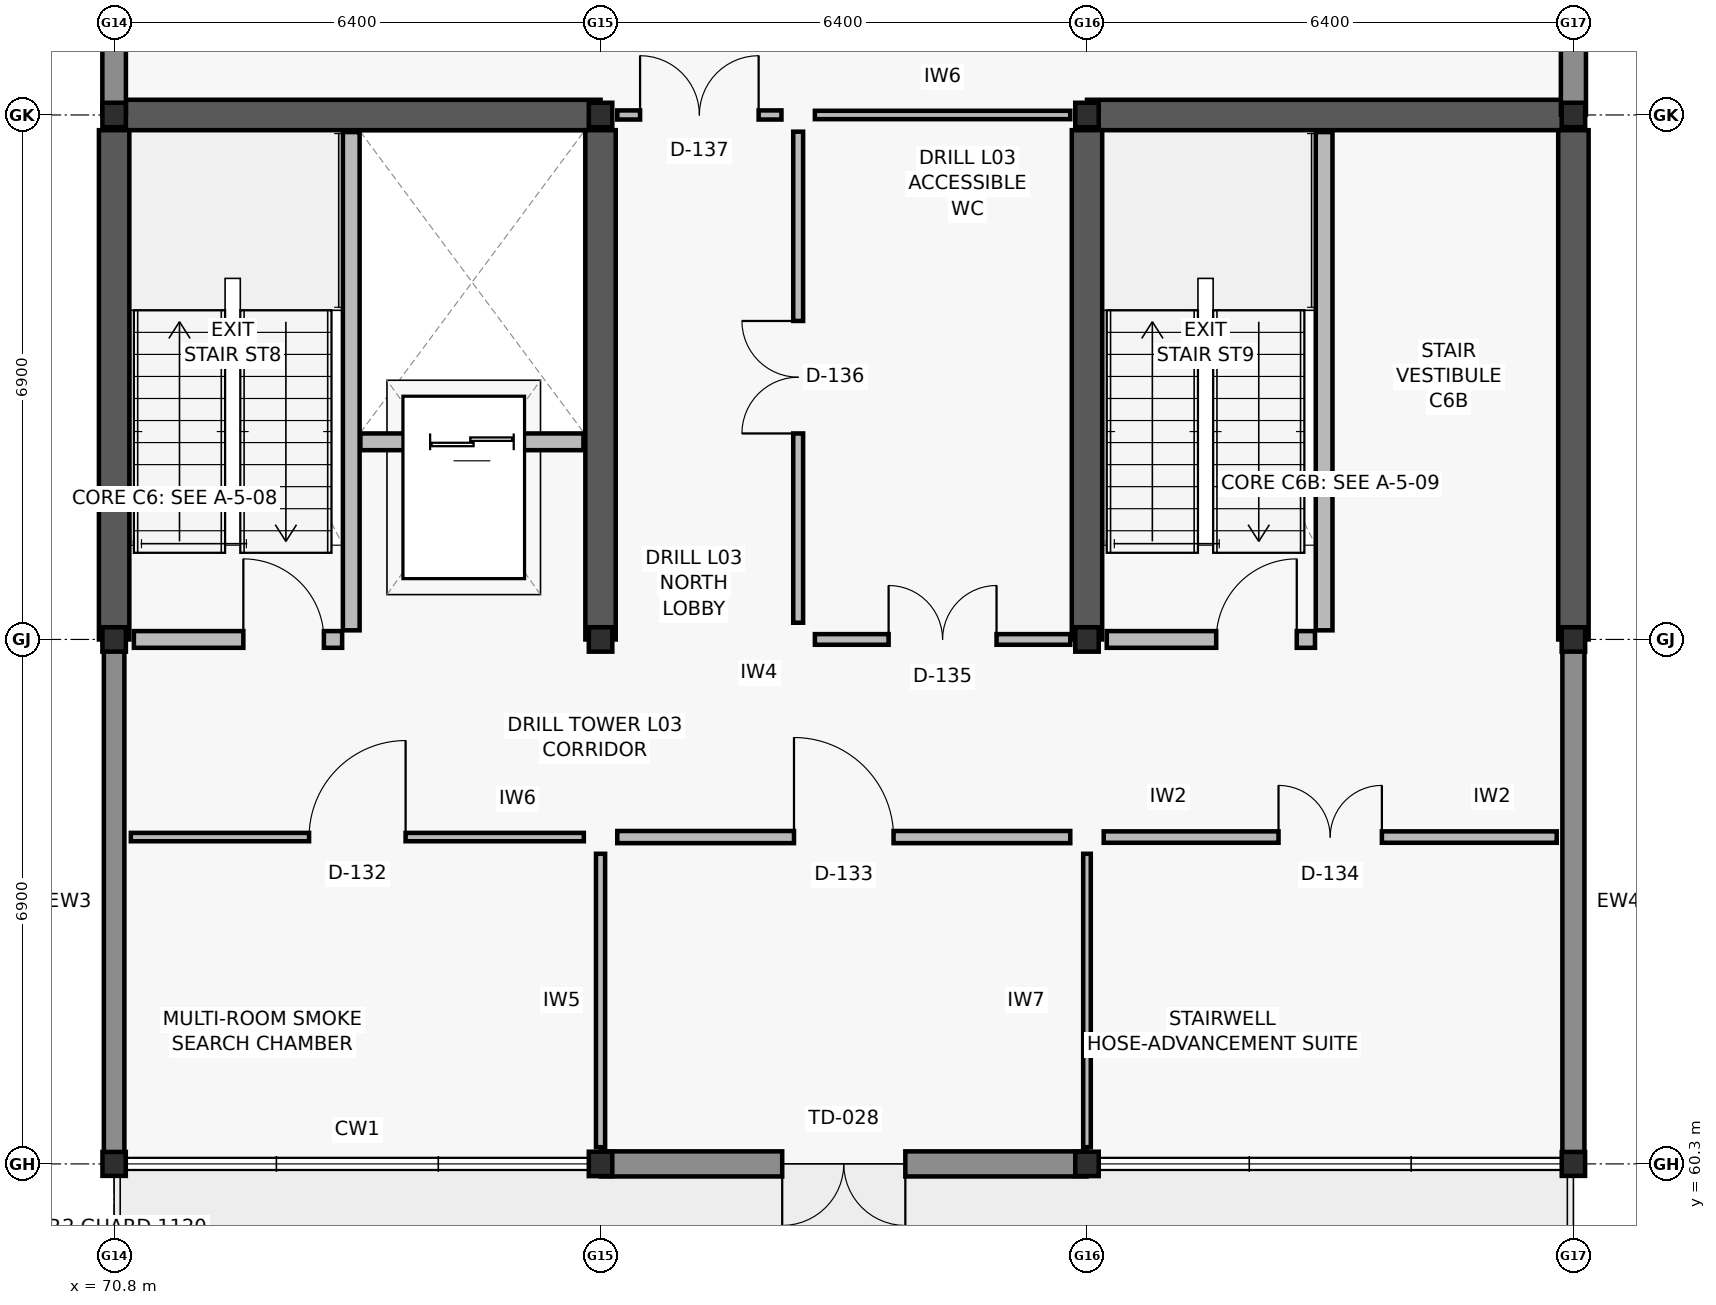
"""IFC4 building model, lengths in metres.
Left out: names, types, materials, properties, quantities, classifications, styles, units other than length and angle.
Written with IfcOpenShell. Run it as: python <this file> out.ifc"""

import sys

from ifc_helpers import new_model, si_unit, direction, frame, frame_2d, origin, origin_2d, place, context, subcontext, project, spatial, rectangle, i_section, extrude, element, fill, save


model = new_model("IFC4")
c1 = context("Model", 3, precision=1e-05, world=origin(), true_north=direction((0.0, 1.0)))
c2 = subcontext(c1, "Body", "Model", "MODEL_VIEW")
j1 = project(units=[si_unit("LENGTHUNIT", "METRE"), si_unit("PLANEANGLEUNIT", "RADIAN")], contexts=[c1])
p1 = place(None, origin())
s1 = spatial("IfcSite", under=j1, at=p1, CompositionType="ELEMENT")
p2 = place(p1, origin())
s2 = spatial("IfcBuilding", under=s1, at=p2, CompositionType="ELEMENT")
p3 = place(p2, frame((0.0, 0.0, 13.5)))
s3 = spatial("IfcBuildingStorey", under=s2, at=p3, CompositionType="ELEMENT", Elevation=13.5)
p4 = place(p3, frame((70.8, 60.3, 0.0), z_axis=(0.0, 0.0, 1.0), x_axis=(1.0, 0.0, 0.0)))
e1 = element("IfcColumn", 1, at=p4, inside=s3, PredefinedType="COLUMN", context=c2, shape_type="SweptSolid", body=[
    extrude(i_section(OverallWidth=0.307, OverallDepth=0.315, WebThickness=0.012, FlangeThickness=0.019, FilletRadius=0.017, at=origin_2d()), origin(), (0.0, 0.0, 1.0), 3.9),
])
for number, where, z_axis, x_axis in (
    (2, (70.8, 67.2, 0.0), (0.0, 0.0, 1.0), (1.0, 0.0, 0.0)),
    (3, (70.8, 74.1, 0.0), (0.0, 0.0, 1.0), (1.0, 0.0, 0.0)),
    (4, (77.2, 60.3, 0.0), (0.0, 0.0, 1.0), (1.0, 0.0, 0.0)),
    (5, (77.2, 67.2, 0.0), (0.0, 0.0, 1.0), (1.0, 0.0, 0.0)),
    (6, (77.2, 74.1, 0.0), (0.0, 0.0, 1.0), (1.0, 0.0, 0.0)),
    (7, (83.6, 60.3, 0.0), (0.0, 0.0, 1.0), (1.0, 0.0, 0.0)),
    (8, (83.6, 67.2, 0.0), (0.0, 0.0, 1.0), (1.0, 0.0, 0.0)),
    (9, (83.6, 74.1, 0.0), (0.0, 0.0, 1.0), (1.0, 0.0, 0.0)),
):
    element("IfcColumn", number, at=place(p3, frame(where, z_axis=z_axis, x_axis=x_axis)), inside=s3, PredefinedType="COLUMN", context=c2, shape_type="SweptSolid", body=[
        extrude(i_section(OverallWidth=0.309, OverallDepth=0.321, WebThickness=0.014, FlangeThickness=0.022, FilletRadius=0.017, at=origin_2d()), origin(), (0.0, 0.0, 1.0), 3.9),
    ])
p5 = place(p3, frame((90.0, 60.3, 0.0), z_axis=(0.0, 0.0, 1.0), x_axis=(1.0, 0.0, 0.0)))
e10 = element("IfcColumn", 10, at=p5, inside=s3, PredefinedType="COLUMN", context=c2, shape_type="SweptSolid", body=[
    extrude(i_section(OverallWidth=0.307, OverallDepth=0.315, WebThickness=0.012, FlangeThickness=0.019, FilletRadius=0.017, at=origin_2d()), origin(), (0.0, 0.0, 1.0), 3.9),
])
for number, where, z_axis, x_axis in (
    (11, (90.0, 67.2, 0.0), (0.0, 0.0, 1.0), (1.0, 0.0, 0.0)),
    (12, (90.0, 74.1, 0.0), (0.0, 0.0, 1.0), (1.0, 0.0, 0.0)),
):
    element("IfcColumn", number, at=place(p3, frame(where, z_axis=z_axis, x_axis=x_axis)), inside=s3, PredefinedType="COLUMN", context=c2, shape_type="SweptSolid", body=[
        extrude(i_section(OverallWidth=0.309, OverallDepth=0.321, WebThickness=0.014, FlangeThickness=0.022, FilletRadius=0.017, at=origin_2d()), origin(), (0.0, 0.0, 1.0), 3.9),
    ])
p6 = place(p3, frame((70.8, 74.1, 0.0), z_axis=(0.0, 0.0, 1.0), x_axis=(1.0, 0.0, 0.0)))
e13 = element("IfcWall", 13, at=p6, inside=s3, PredefinedType="SHEAR", context=c2, shape_type="SweptSolid", body=[
    extrude(rectangle(XDim=6.4, YDim=0.4, at=frame_2d((3.2, 0.0))), origin(), (0.0, 0.0, 1.0), 3.66),
])
for number, where, z_axis, x_axis in (
    (14, (70.8, 67.2, 0.0), (0.0, 0.0, 1.0), (0.0, 1.0, 0.0)),
    (15, (77.2, 67.2, 0.0), (0.0, 0.0, 1.0), (0.0, 1.0, 0.0)),
):
    element("IfcWall", number, at=place(p3, frame(where, z_axis=z_axis, x_axis=x_axis)), inside=s3, PredefinedType="SHEAR", context=c2, shape_type="SweptSolid", body=[
        extrude(rectangle(XDim=6.7, YDim=0.4, at=frame_2d((3.35, 0.0))), origin(), (0.0, 0.0, 1.0), 3.66),
    ])
p7 = place(p3, frame((83.6, 74.1, 0.0), z_axis=(0.0, 0.0, 1.0), x_axis=(1.0, 0.0, 0.0)))
e16 = element("IfcWall", 16, at=p7, inside=s3, PredefinedType="SHEAR", context=c2, shape_type="SweptSolid", body=[
    extrude(rectangle(XDim=6.4, YDim=0.4, at=frame_2d((3.2, 0.0))), origin(), (0.0, 0.0, 1.0), 3.66),
])
for number, where, z_axis, x_axis in (
    (17, (83.6, 67.2, 0.0), (0.0, 0.0, 1.0), (0.0, 1.0, 0.0)),
    (18, (90.0, 67.2, 0.0), (0.0, 0.0, 1.0), (0.0, 1.0, 0.0)),
):
    element("IfcWall", number, at=place(p3, frame(where, z_axis=z_axis, x_axis=x_axis)), inside=s3, PredefinedType="SHEAR", context=c2, shape_type="SweptSolid", body=[
        extrude(rectangle(XDim=6.7, YDim=0.4, at=frame_2d((3.35, 0.0))), origin(), (0.0, 0.0, 1.0), 3.66),
    ])
p8 = place(p3, frame((83.595, 60.3, 0.0), z_axis=(0.0, 0.0, 1.0), x_axis=(-1.0, 0.0, 0.0)))
e19 = element("IfcWall", 19, at=p8, inside=s3, PredefinedType="SOLIDWALL", context=c2, shape_type="SweptSolid", body=[
    extrude(rectangle(XDim=6.39, YDim=0.33, at=frame_2d((3.195, 0.0))), origin(), (0.0, 0.0, 1.0), 3.02),
])
p9 = place(p8, frame((2.385, 0.0, 0.0)))
e20 = element("IfcOpeningElement", 20, at=p9, cuts=e19, PredefinedType="OPENING", context=c2, shape_type="SweptSolid", body=[
    extrude(rectangle(XDim=1.62, YDim=2.18, at=frame_2d((0.81, 1.09))), frame((0.0, 0.175, 0.0), z_axis=(0.0, -1.0, 0.0), x_axis=(1.0, 0.0, 0.0)), (0.0, 0.0, 1.0), 0.35),
])
p10 = place(p3, frame((70.8, 60.305, 0.0), z_axis=(0.0, 0.0, 1.0), x_axis=(0.0, 1.0, 0.0)))
e21 = element("IfcWall", 21, at=p10, inside=s3, PredefinedType="SOLIDWALL", context=c2, shape_type="SweptSolid", body=[
    extrude(rectangle(XDim=6.89, YDim=0.27, at=frame_2d((3.445, 0.0))), origin(), (0.0, 0.0, 1.0), 3.02),
])
p11 = place(p3, frame((90.0, 67.195, 0.0), z_axis=(0.0, 0.0, 1.0), x_axis=(0.0, -1.0, 0.0)))
e22 = element("IfcWall", 22, at=p11, inside=s3, PredefinedType="SOLIDWALL", context=c2, shape_type="SweptSolid", body=[
    extrude(rectangle(XDim=6.89, YDim=0.29, at=frame_2d((3.445, 0.0))), origin(), (0.0, 0.0, 1.0), 3.02),
])
p12 = place(p3, frame((70.8, 74.105, 0.0), z_axis=(0.0, 0.0, 1.0), x_axis=(0.0, 1.0, 0.0)))
e23 = element("IfcWall", 23, at=p12, inside=s3, PredefinedType="SOLIDWALL", context=c2, shape_type="SweptSolid", body=[
    extrude(rectangle(XDim=6.89, YDim=0.31, at=frame_2d((3.445, 0.0))), origin(), (0.0, 0.0, 1.0), 3.02),
])
p13 = place(p12, frame((2.745, 0.0, 0.8)))
e24 = element("IfcOpeningElement", 24, at=p13, cuts=e23, PredefinedType="OPENING", context=c2, shape_type="SweptSolid", body=[
    extrude(rectangle(XDim=1.4, YDim=1.65, at=frame_2d((0.7, 0.825))), frame((0.0, 0.165, 0.0), z_axis=(0.0, -1.0, 0.0), x_axis=(1.0, 0.0, 0.0)), (0.0, 0.0, 1.0), 0.33),
])
p14 = place(p3, frame((90.0, 80.995, 0.0), z_axis=(0.0, 0.0, 1.0), x_axis=(0.0, -1.0, 0.0)))
e25 = element("IfcWall", 25, at=p14, inside=s3, PredefinedType="SOLIDWALL", context=c2, shape_type="SweptSolid", body=[
    extrude(rectangle(XDim=6.89, YDim=0.33, at=frame_2d((3.445, 0.0))), origin(), (0.0, 0.0, 1.0), 3.02),
])
p15 = place(p14, frame((2.67, 0.0, 0.8)))
e26 = element("IfcOpeningElement", 26, at=p15, cuts=e25, PredefinedType="OPENING", context=c2, shape_type="SweptSolid", body=[
    extrude(rectangle(XDim=1.55, YDim=1.65, at=frame_2d((0.775, 0.825))), frame((0.0, 0.175, 0.0), z_axis=(0.0, -1.0, 0.0), x_axis=(1.0, 0.0, 0.0)), (0.0, 0.0, 1.0), 0.35),
])
p16 = place(p3, frame((73.92, 67.32, 0.0), z_axis=(0.0, 0.0, 1.0), x_axis=(0.0, 1.0, 0.0)))
e27 = element("IfcWall", 27, at=p16, inside=s3, PredefinedType="SOLIDWALL", context=c2, shape_type="SweptSolid", body=[
    extrude(rectangle(XDim=6.555, YDim=0.22, at=frame_2d((3.277, 0.0))), origin(), (0.0, 0.0, 1.0), 3.66),
])
p17 = place(p3, frame((71.06, 67.2, 0.0), z_axis=(0.0, 0.0, 1.0), x_axis=(1.0, 0.0, 0.0)))
e28 = element("IfcWall", 28, at=p17, inside=s3, PredefinedType="SOLIDWALL", context=c2, shape_type="SweptSolid", body=[
    extrude(rectangle(XDim=2.74, YDim=0.22, at=frame_2d((1.37, 0.0))), origin(), (0.0, 0.0, 1.0), 3.02),
])
p18 = place(p17, frame((1.44, 0.0, 0.0)))
e29 = element("IfcOpeningElement", 29, at=p18, cuts=e28, PredefinedType="OPENING", context=c2, shape_type="SweptSolid", body=[
    extrude(rectangle(XDim=1.06, YDim=2.1, at=frame_2d((0.53, 1.05))), frame((0.0, 0.12, 0.0), z_axis=(0.0, -1.0, 0.0), x_axis=(1.0, 0.0, 0.0)), (0.0, 0.0, 1.0), 0.24),
])
p19 = place(p3, frame((74.04, 69.8, 0.0), z_axis=(0.0, 0.0, 1.0), x_axis=(1.0, 0.0, 0.0)))
e30 = element("IfcWall", 30, at=p19, inside=s3, PredefinedType="SOLIDWALL", context=c2, shape_type="SweptSolid", body=[
    extrude(rectangle(XDim=2.935, YDim=0.22, at=frame_2d((1.468, 0.0))), origin(), (0.0, 0.0, 1.0), 3.66),
])
p20 = place(p19, frame((0.917, 0.0, 0.0)))
e31 = element("IfcOpeningElement", 31, at=p20, cuts=e30, PredefinedType="OPENING", context=c2, shape_type="SweptSolid", body=[
    extrude(rectangle(XDim=1.1, YDim=2.1, at=frame_2d((0.55, 1.05))), frame((0.0, 0.12, 0.0), z_axis=(0.0, -1.0, 0.0), x_axis=(1.0, 0.0, 0.0)), (0.0, 0.0, 1.0), 0.24),
])
p21 = place(p3, frame((86.72, 67.32, 0.0), z_axis=(0.0, 0.0, 1.0), x_axis=(0.0, 1.0, 0.0)))
e32 = element("IfcWall", 32, at=p21, inside=s3, PredefinedType="SOLIDWALL", context=c2, shape_type="SweptSolid", body=[
    extrude(rectangle(XDim=6.555, YDim=0.22, at=frame_2d((3.277, 0.0))), origin(), (0.0, 0.0, 1.0), 3.66),
])
p22 = place(p3, frame((83.86, 67.2, 0.0), z_axis=(0.0, 0.0, 1.0), x_axis=(1.0, 0.0, 0.0)))
e33 = element("IfcWall", 33, at=p22, inside=s3, PredefinedType="SOLIDWALL", context=c2, shape_type="SweptSolid", body=[
    extrude(rectangle(XDim=2.74, YDim=0.22, at=frame_2d((1.37, 0.0))), origin(), (0.0, 0.0, 1.0), 3.02),
])
p23 = place(p22, frame((1.44, 0.0, 0.0)))
e34 = element("IfcOpeningElement", 34, at=p23, cuts=e33, PredefinedType="OPENING", context=c2, shape_type="SweptSolid", body=[
    extrude(rectangle(XDim=1.06, YDim=2.1, at=frame_2d((0.53, 1.05))), frame((0.0, 0.12, 0.0), z_axis=(0.0, -1.0, 0.0), x_axis=(1.0, 0.0, 0.0)), (0.0, 0.0, 1.0), 0.24),
])
p24 = place(p3, frame((77.2, 60.52, 0.0), z_axis=(0.0, 0.0, 1.0), x_axis=(0.0, 1.0, 0.0)))
e35 = element("IfcWall", 35, at=p24, inside=s3, PredefinedType="PARTITIONING", context=c2, shape_type="SweptSolid", body=[
    extrude(rectangle(XDim=3.86, YDim=0.12, at=frame_2d((1.93, 0.0))), origin(), (0.0, 0.0, 1.0), 3.0),
])
p25 = place(p3, frame((71.02, 64.6, 0.0), z_axis=(0.0, 0.0, 1.0), x_axis=(1.0, 0.0, 0.0)))
e36 = element("IfcWall", 36, at=p25, inside=s3, PredefinedType="PARTITIONING", context=c2, shape_type="SweptSolid", body=[
    extrude(rectangle(XDim=5.96, YDim=0.11, at=frame_2d((2.98, 0.0))), origin(), (0.0, 0.0, 1.0), 3.0),
])
p26 = place(p25, frame((2.345, 0.0, 0.0)))
e37 = element("IfcOpeningElement", 37, at=p26, cuts=e36, PredefinedType="OPENING", context=c2, shape_type="SweptSolid", body=[
    extrude(rectangle(XDim=1.27, YDim=2.1, at=frame_2d((0.635, 1.05))), frame((0.0, 0.065, 0.0), z_axis=(0.0, -1.0, 0.0), x_axis=(1.0, 0.0, 0.0)), (0.0, 0.0, 1.0), 0.13),
])
p27 = place(p3, frame((83.6, 60.52, 0.0), z_axis=(0.0, 0.0, 1.0), x_axis=(0.0, 1.0, 0.0)))
e38 = element("IfcWall", 38, at=p27, inside=s3, PredefinedType="PARTITIONING", context=c2, shape_type="SweptSolid", body=[
    extrude(rectangle(XDim=3.86, YDim=0.1, at=frame_2d((1.93, 0.0))), origin(), (0.0, 0.0, 1.0), 3.0),
])
p28 = place(p3, frame((77.42, 64.6, 0.0), z_axis=(0.0, 0.0, 1.0), x_axis=(1.0, 0.0, 0.0)))
e39 = element("IfcWall", 39, at=p28, inside=s3, PredefinedType="PARTITIONING", context=c2, shape_type="SweptSolid", body=[
    extrude(rectangle(XDim=5.96, YDim=0.16, at=frame_2d((2.98, 0.0))), origin(), (0.0, 0.0, 1.0), 3.0),
])
p29 = place(p28, frame((2.325, 0.0, 0.0)))
e40 = element("IfcOpeningElement", 40, at=p29, cuts=e39, PredefinedType="OPENING", context=c2, shape_type="SweptSolid", body=[
    extrude(rectangle(XDim=1.31, YDim=2.14, at=frame_2d((0.655, 1.07))), frame((0.0, 0.09, 0.0), z_axis=(0.0, -1.0, 0.0), x_axis=(1.0, 0.0, 0.0)), (0.0, 0.0, 1.0), 0.18),
])
p30 = place(p3, frame((83.82, 64.6, 0.0), z_axis=(0.0, 0.0, 1.0), x_axis=(1.0, 0.0, 0.0)))
e41 = element("IfcWall", 41, at=p30, inside=s3, PredefinedType="PARTITIONING", context=c2, shape_type="SweptSolid", body=[
    extrude(rectangle(XDim=5.96, YDim=0.15, at=frame_2d((2.98, 0.0))), origin(), (0.0, 0.0, 1.0), 3.0),
])
p31 = place(p30, frame((2.3, 0.0, 0.0)))
e42 = element("IfcOpeningElement", 42, at=p31, cuts=e41, PredefinedType="OPENING", context=c2, shape_type="SweptSolid", body=[
    extrude(rectangle(XDim=1.36, YDim=2.15, at=frame_2d((0.68, 1.075))), frame((0.0, 0.085, 0.0), z_axis=(0.0, -1.0, 0.0), x_axis=(1.0, 0.0, 0.0)), (0.0, 0.0, 1.0), 0.17),
])
p32 = place(p3, frame((80.02, 67.2, 0.0), z_axis=(0.0, 0.0, 1.0), x_axis=(1.0, 0.0, 0.0)))
e43 = element("IfcWall", 43, at=p32, inside=s3, PredefinedType="PARTITIONING", context=c2, shape_type="SweptSolid", body=[
    extrude(rectangle(XDim=3.36, YDim=0.14, at=frame_2d((1.68, 0.0))), origin(), (0.0, 0.0, 1.0), 3.0),
])
p33 = place(p32, frame((0.97, 0.0, 0.0)))
e44 = element("IfcOpeningElement", 44, at=p33, cuts=e43, PredefinedType="OPENING", context=c2, shape_type="SweptSolid", body=[
    extrude(rectangle(XDim=1.42, YDim=2.15, at=frame_2d((0.71, 1.075))), frame((0.0, 0.08, 0.0), z_axis=(0.0, -1.0, 0.0), x_axis=(1.0, 0.0, 0.0)), (0.0, 0.0, 1.0), 0.16),
])
p34 = place(p3, frame((79.8, 67.42, 0.0), z_axis=(0.0, 0.0, 1.0), x_axis=(0.0, 1.0, 0.0)))
e45 = element("IfcWall", 45, at=p34, inside=s3, PredefinedType="PARTITIONING", context=c2, shape_type="SweptSolid", body=[
    extrude(rectangle(XDim=6.46, YDim=0.13, at=frame_2d((3.23, 0.0))), origin(), (0.0, 0.0, 1.0), 3.0),
])
p35 = place(p34, frame((2.49, 0.0, 0.0)))
e46 = element("IfcOpeningElement", 46, at=p35, cuts=e45, PredefinedType="OPENING", context=c2, shape_type="SweptSolid", body=[
    extrude(rectangle(XDim=1.48, YDim=2.18, at=frame_2d((0.74, 1.09))), frame((0.0, 0.075, 0.0), z_axis=(0.0, -1.0, 0.0), x_axis=(1.0, 0.0, 0.0)), (0.0, 0.0, 1.0), 0.15),
])
p36 = place(p3, frame((77.42, 74.1, 0.0), z_axis=(0.0, 0.0, 1.0), x_axis=(1.0, 0.0, 0.0)))
e47 = element("IfcWall", 47, at=p36, inside=s3, PredefinedType="PARTITIONING", context=c2, shape_type="SweptSolid", body=[
    extrude(rectangle(XDim=2.16, YDim=0.12, at=frame_2d((1.08, 0.0))), origin(), (0.0, 0.0, 1.0), 3.0),
])
p37 = place(p36, frame((0.3, 0.0, 0.0)))
e48 = element("IfcOpeningElement", 48, at=p37, cuts=e47, PredefinedType="OPENING", context=c2, shape_type="SweptSolid", body=[
    extrude(rectangle(XDim=1.56, YDim=2.18, at=frame_2d((0.78, 1.09))), frame((0.0, 0.07, 0.0), z_axis=(0.0, -1.0, 0.0), x_axis=(1.0, 0.0, 0.0)), (0.0, 0.0, 1.0), 0.14),
])
p38 = place(p3, frame((80.02, 74.1, 0.0), z_axis=(0.0, 0.0, 1.0), x_axis=(1.0, 0.0, 0.0)))
e49 = element("IfcWall", 49, at=p38, inside=s3, PredefinedType="PARTITIONING", context=c2, shape_type="SweptSolid", body=[
    extrude(rectangle(XDim=3.36, YDim=0.11, at=frame_2d((1.68, 0.0))), origin(), (0.0, 0.0, 1.0), 3.0),
])
p39 = place(p9, origin())
e50 = element("IfcDoor", 50, at=p39, inside=s3, OperationType="DOUBLE_DOOR_SINGLE_SWING", PredefinedType="DOOR", context=c2, shape_type="SweptSolid", body=[
    extrude(rectangle(XDim=1.62, YDim=2.18, at=frame_2d((0.81, 1.09))), frame((0.0, 0.025, 0.0), z_axis=(0.0, -1.0, 0.0), x_axis=(1.0, 0.0, 0.0)), (0.0, 0.0, 1.0), 0.05),
])
fill(e20, e50)
p40 = place(p18, origin())
e51 = element("IfcDoor", 51, at=p40, inside=s3, OperationType="SINGLE_SWING_LEFT", PredefinedType="DOOR", context=c2, shape_type="SweptSolid", body=[
    extrude(rectangle(XDim=1.06, YDim=2.1, at=frame_2d((0.53, 1.05))), frame((0.0, 0.025, 0.0), z_axis=(0.0, -1.0, 0.0), x_axis=(1.0, 0.0, 0.0)), (0.0, 0.0, 1.0), 0.05),
])
fill(e29, e51)
p41 = place(p20, origin())
e52 = element("IfcDoor", 52, at=p41, inside=s3, OperationType="DOUBLE_DOOR_SLIDING", PredefinedType="DOOR", context=c2, shape_type="SweptSolid", body=[
    extrude(rectangle(XDim=1.1, YDim=2.1, at=frame_2d((0.55, 1.05))), frame((0.0, 0.025, 0.0), z_axis=(0.0, -1.0, 0.0), x_axis=(1.0, 0.0, 0.0)), (0.0, 0.0, 1.0), 0.05),
])
fill(e31, e52)
p42 = place(p23, origin())
e53 = element("IfcDoor", 53, at=p42, inside=s3, OperationType="SINGLE_SWING_RIGHT", PredefinedType="DOOR", context=c2, shape_type="SweptSolid", body=[
    extrude(rectangle(XDim=1.06, YDim=2.1, at=frame_2d((0.53, 1.05))), frame((0.0, 0.025, 0.0), z_axis=(0.0, -1.0, 0.0), x_axis=(1.0, 0.0, 0.0)), (0.0, 0.0, 1.0), 0.05),
])
fill(e34, e53)
p43 = place(p26, origin())
e54 = element("IfcDoor", 54, at=p43, inside=s3, OperationType="SINGLE_SWING_RIGHT", PredefinedType="DOOR", context=c2, shape_type="SweptSolid", body=[
    extrude(rectangle(XDim=1.27, YDim=2.1, at=frame_2d((0.635, 1.05))), frame((0.0, 0.025, 0.0), z_axis=(0.0, -1.0, 0.0), x_axis=(1.0, 0.0, 0.0)), (0.0, 0.0, 1.0), 0.05),
])
fill(e37, e54)
p44 = place(p29, origin())
e55 = element("IfcDoor", 55, at=p44, inside=s3, OperationType="SINGLE_SWING_LEFT", PredefinedType="DOOR", context=c2, shape_type="SweptSolid", body=[
    extrude(rectangle(XDim=1.31, YDim=2.14, at=frame_2d((0.655, 1.07))), frame((0.0, 0.025, 0.0), z_axis=(0.0, -1.0, 0.0), x_axis=(1.0, 0.0, 0.0)), (0.0, 0.0, 1.0), 0.05),
])
fill(e40, e55)
p45 = place(p31, origin())
e56 = element("IfcDoor", 56, at=p45, inside=s3, OperationType="DOUBLE_DOOR_SINGLE_SWING", PredefinedType="DOOR", context=c2, shape_type="SweptSolid", body=[
    extrude(rectangle(XDim=1.36, YDim=2.15, at=frame_2d((0.68, 1.075))), frame((0.0, 0.025, 0.0), z_axis=(0.0, -1.0, 0.0), x_axis=(1.0, 0.0, 0.0)), (0.0, 0.0, 1.0), 0.05),
])
fill(e42, e56)
p46 = place(p33, origin())
e57 = element("IfcDoor", 57, at=p46, inside=s3, OperationType="DOUBLE_DOOR_SINGLE_SWING", PredefinedType="DOOR", context=c2, shape_type="SweptSolid", body=[
    extrude(rectangle(XDim=1.42, YDim=2.15, at=frame_2d((0.71, 1.075))), frame((0.0, 0.025, 0.0), z_axis=(0.0, -1.0, 0.0), x_axis=(1.0, 0.0, 0.0)), (0.0, 0.0, 1.0), 0.05),
])
fill(e44, e57)
p47 = place(p35, origin())
e58 = element("IfcDoor", 58, at=p47, inside=s3, OperationType="DOUBLE_DOOR_SINGLE_SWING", PredefinedType="DOOR", context=c2, shape_type="SweptSolid", body=[
    extrude(rectangle(XDim=1.48, YDim=2.18, at=frame_2d((0.74, 1.09))), frame((0.0, 0.025, 0.0), z_axis=(0.0, -1.0, 0.0), x_axis=(1.0, 0.0, 0.0)), (0.0, 0.0, 1.0), 0.05),
])
fill(e46, e58)
p48 = place(p37, origin())
e59 = element("IfcDoor", 59, at=p48, inside=s3, OperationType="DOUBLE_DOOR_SINGLE_SWING", PredefinedType="DOOR", context=c2, shape_type="SweptSolid", body=[
    extrude(rectangle(XDim=1.56, YDim=2.18, at=frame_2d((0.78, 1.09))), frame((0.0, 0.025, 0.0), z_axis=(0.0, -1.0, 0.0), x_axis=(1.0, 0.0, 0.0)), (0.0, 0.0, 1.0), 0.05),
])
fill(e48, e59)
save(model, sys.argv[1])
